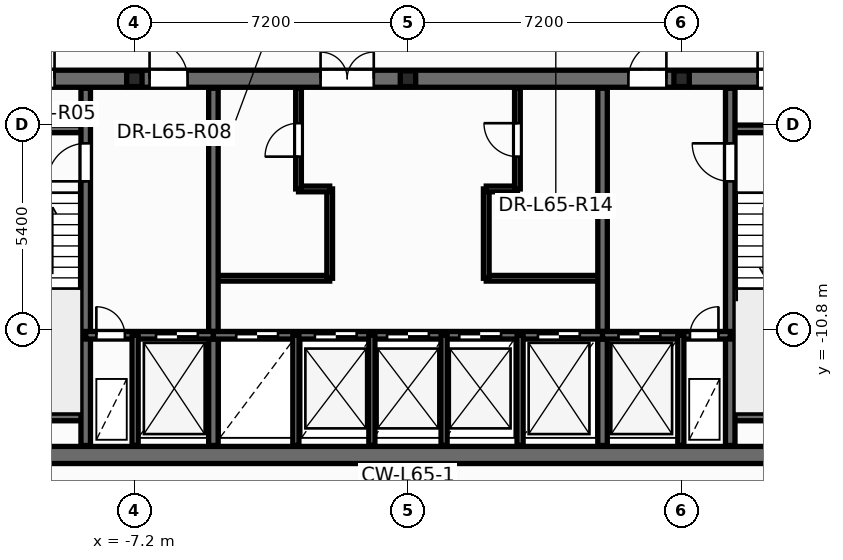
"""IFC4 building model, lengths in metres.
Left out: names, types, materials, properties, quantities, classifications, styles, units other than length and angle.
Written with IfcOpenShell. Run it as: python <this file> out.ifc"""

import sys

from ifc_helpers import new_model, si_unit, direction, frame, frame_2d, origin, origin_2d, place, context, subcontext, project, spatial, rectangle, i_section, extrude, element, fill, save


model = new_model("IFC4")
c1 = context("Model", 3, precision=1e-05, world=origin(), true_north=direction((0.0, 1.0)))
c2 = subcontext(c1, "Body", "Model", "MODEL_VIEW")
j1 = project(units=[si_unit("LENGTHUNIT", "METRE"), si_unit("PLANEANGLEUNIT", "RADIAN")], contexts=[c1])
p1 = place(None, origin())
s1 = spatial("IfcSite", under=j1, at=p1, CompositionType="ELEMENT")
p2 = place(p1, origin())
s2 = spatial("IfcBuilding", under=s1, at=p2, CompositionType="ELEMENT")
p3 = place(p2, frame((0.0, 0.0, 249.0)))
s3 = spatial("IfcBuildingStorey", under=s2, at=p3, CompositionType="ELEMENT", Elevation=249.0)
for number, where, z_axis, x_axis in (
    (1, (-7.2, -4.2, 0.0), (0.0, 0.0, 1.0), (1.0, 0.0, 0.0)),
    (2, (0.0, -4.2, 0.0), (0.0, 0.0, 1.0), (1.0, 0.0, 0.0)),
    (3, (7.2, -4.2, 0.0), (0.0, 0.0, 1.0), (1.0, 0.0, 0.0)),
):
    element("IfcColumn", number, at=place(p3, frame(where, z_axis=z_axis, x_axis=x_axis)), inside=s3, PredefinedType="PILASTER", context=c2, shape_type="SweptSolid", body=[
        extrude(i_section(OverallWidth=0.405, OverallDepth=0.414, WebThickness=0.022, FlangeThickness=0.032, at=origin_2d()), origin(), (0.0, 0.0, 1.0), 3.6),
    ])
p4 = place(p3, frame((-5.12, -9.45, 0.0), z_axis=(0.0, 0.0, 1.0), x_axis=(1.0, 0.0, 0.0)))
e4 = element("IfcWall", 4, at=p4, inside=s3, PredefinedType="PARTITIONING", context=c2, shape_type="SweptSolid", body=[
    extrude(rectangle(XDim=3.06, YDim=0.15, at=frame_2d((1.53, 0.0))), origin(), (0.0, 0.0, 1.0), 3.345),
])
p5 = place(p3, frame((-2.06, -9.45, 0.0), z_axis=(0.0, 0.0, 1.0), x_axis=(0.0, 1.0, 0.0)))
e5 = element("IfcWall", 5, at=p5, inside=s3, PredefinedType="PARTITIONING", context=c2, shape_type="SweptSolid", body=[
    extrude(rectangle(XDim=2.35, YDim=0.15, at=frame_2d((1.175, 0.0))), origin(), (0.0, 0.0, 1.0), 3.345),
])
p6 = place(p3, frame((-2.88, -7.1, 0.0), z_axis=(0.0, 0.0, 1.0), x_axis=(1.0, 0.0, 0.0)))
e6 = element("IfcWall", 6, at=p6, inside=s3, PredefinedType="PARTITIONING", context=c2, shape_type="SweptSolid", body=[
    extrude(rectangle(XDim=0.82, YDim=0.15, at=frame_2d((0.41, 0.0))), origin(), (0.0, 0.0, 1.0), 3.345),
])
p7 = place(p3, frame((-2.88, -7.1, 0.0), z_axis=(0.0, 0.0, 1.0), x_axis=(0.0, 1.0, 0.0)))
e7 = element("IfcWall", 7, at=p7, inside=s3, PredefinedType="PARTITIONING", context=c2, shape_type="SweptSolid", body=[
    extrude(rectangle(XDim=2.65, YDim=0.15, at=frame_2d((1.325, 0.0))), origin(), (0.0, 0.0, 1.0), 3.345),
])
p8 = place(p7, frame((0.85, 0.0, 0.0)))
e8 = element("IfcOpeningElement", 8, at=p8, cuts=e7, PredefinedType="OPENING", context=c2, shape_type="SweptSolid", body=[
    extrude(rectangle(XDim=0.886, YDim=2.104, at=frame_2d((0.44, 1.052))), frame((0.0, 0.085, 0.0), z_axis=(0.0, -1.0, 0.0), x_axis=(1.0, 0.0, 0.0)), (0.0, 0.0, 1.0), 0.17),
])
p9 = place(p3, frame((2.06, -9.45, 0.0), z_axis=(0.0, 0.0, 1.0), x_axis=(1.0, 0.0, 0.0)))
e9 = element("IfcWall", 9, at=p9, inside=s3, PredefinedType="PARTITIONING", context=c2, shape_type="SweptSolid", body=[
    extrude(rectangle(XDim=3.06, YDim=0.15, at=frame_2d((1.53, 0.0))), origin(), (0.0, 0.0, 1.0), 3.345),
])
p10 = place(p3, frame((2.06, -9.45, 0.0), z_axis=(0.0, 0.0, 1.0), x_axis=(0.0, 1.0, 0.0)))
e10 = element("IfcWall", 10, at=p10, inside=s3, PredefinedType="PARTITIONING", context=c2, shape_type="SweptSolid", body=[
    extrude(rectangle(XDim=2.35, YDim=0.15, at=frame_2d((1.175, 0.0))), origin(), (0.0, 0.0, 1.0), 3.345),
])
p11 = place(p3, frame((2.06, -7.1, 0.0), z_axis=(0.0, 0.0, 1.0), x_axis=(1.0, 0.0, 0.0)))
e11 = element("IfcWall", 11, at=p11, inside=s3, PredefinedType="PARTITIONING", context=c2, shape_type="SweptSolid", body=[
    extrude(rectangle(XDim=0.82, YDim=0.15, at=frame_2d((0.41, 0.0))), origin(), (0.0, 0.0, 1.0), 3.345),
])
p12 = place(p3, frame((2.88, -7.1, 0.0), z_axis=(0.0, 0.0, 1.0), x_axis=(0.0, 1.0, 0.0)))
e12 = element("IfcWall", 12, at=p12, inside=s3, PredefinedType="PARTITIONING", context=c2, shape_type="SweptSolid", body=[
    extrude(rectangle(XDim=2.65, YDim=0.15, at=frame_2d((1.325, 0.0))), origin(), (0.0, 0.0, 1.0), 3.345),
])
p13 = place(p12, frame((0.85, 0.0, 0.0)))
e13 = element("IfcOpeningElement", 13, at=p13, cuts=e12, PredefinedType="OPENING", context=c2, shape_type="SweptSolid", body=[
    extrude(rectangle(XDim=0.886, YDim=2.104, at=frame_2d((0.44, 1.052))), frame((0.0, 0.085, 0.0), z_axis=(0.0, -1.0, 0.0), x_axis=(1.0, 0.0, 0.0)), (0.0, 0.0, 1.0), 0.17),
])
p14 = place(p3, frame((-12.65, -14.1, 0.0), z_axis=(0.0, 0.0, 1.0), x_axis=(1.0, 0.0, 0.0)))
e14 = element("IfcWall", 14, at=p14, inside=s3, PredefinedType="SHEAR", context=c2, shape_type="SweptSolid", body=[
    extrude(rectangle(XDim=25.3, YDim=0.45, at=frame_2d((12.65, 0.0))), origin(), (0.0, 0.0, 1.0), 3.6),
])
p15 = place(p3, frame((-12.65, -4.2, 0.0), z_axis=(0.0, 0.0, 1.0), x_axis=(1.0, 0.0, 0.0)))
e15 = element("IfcWall", 15, at=p15, inside=s3, PredefinedType="SHEAR", context=c2, shape_type="SweptSolid", body=[
    extrude(rectangle(XDim=25.3, YDim=0.45, at=frame_2d((12.65, 0.0))), origin(), (0.0, 0.0, 1.0), 3.6),
])
p16 = place(p15, frame((0.95, 0.0, 0.0)))
e16 = element("IfcOpeningElement", 16, at=p16, cuts=e15, PredefinedType="OPENING", context=c2, shape_type="SweptSolid", body=[
    extrude(rectangle(XDim=0.756, YDim=2.054, at=frame_2d((0.375, 1.027))), frame((0.0, 0.235, 0.0), z_axis=(0.0, -1.0, 0.0), x_axis=(1.0, 0.0, 0.0)), (0.0, 0.0, 1.0), 0.47),
])
p17 = place(p15, frame((2.6, 0.0, 0.0)))
e17 = element("IfcOpeningElement", 17, at=p17, cuts=e15, PredefinedType="OPENING", context=c2, shape_type="SweptSolid", body=[
    extrude(rectangle(XDim=0.756, YDim=2.054, at=frame_2d((0.375, 1.027))), frame((0.0, 0.235, 0.0), z_axis=(0.0, -1.0, 0.0), x_axis=(1.0, 0.0, 0.0)), (0.0, 0.0, 1.0), 0.47),
])
p18 = place(p15, frame((21.85, 0.0, 0.0)))
e18 = element("IfcOpeningElement", 18, at=p18, cuts=e15, PredefinedType="OPENING", context=c2, shape_type="SweptSolid", body=[
    extrude(rectangle(XDim=0.756, YDim=2.054, at=frame_2d((0.375, 1.027))), frame((0.0, 0.235, 0.0), z_axis=(0.0, -1.0, 0.0), x_axis=(1.0, 0.0, 0.0)), (0.0, 0.0, 1.0), 0.47),
])
p19 = place(p15, frame((23.5, 0.0, 0.0)))
e19 = element("IfcOpeningElement", 19, at=p19, cuts=e15, PredefinedType="OPENING", context=c2, shape_type="SweptSolid", body=[
    extrude(rectangle(XDim=0.756, YDim=2.054, at=frame_2d((0.375, 1.027))), frame((0.0, 0.235, 0.0), z_axis=(0.0, -1.0, 0.0), x_axis=(1.0, 0.0, 0.0)), (0.0, 0.0, 1.0), 0.47),
])
p20 = place(p15, frame((5.85, 0.0, 0.0)))
e20 = element("IfcOpeningElement", 20, at=p20, cuts=e15, PredefinedType="OPENING", context=c2, shape_type="SweptSolid", body=[
    extrude(rectangle(XDim=1.006, YDim=2.104, at=frame_2d((0.5, 1.052))), frame((0.0, 0.235, 0.0), z_axis=(0.0, -1.0, 0.0), x_axis=(1.0, 0.0, 0.0)), (0.0, 0.0, 1.0), 0.47),
])
p21 = place(p15, frame((10.35, 0.0, 0.0)))
e21 = element("IfcOpeningElement", 21, at=p21, cuts=e15, PredefinedType="OPENING", context=c2, shape_type="SweptSolid", body=[
    extrude(rectangle(XDim=1.406, YDim=2.154, at=frame_2d((0.7, 1.077))), frame((0.0, 0.235, 0.0), z_axis=(0.0, -1.0, 0.0), x_axis=(1.0, 0.0, 0.0)), (0.0, 0.0, 1.0), 0.47),
])
p22 = place(p15, frame((18.45, 0.0, 0.0)))
e22 = element("IfcOpeningElement", 22, at=p22, cuts=e15, PredefinedType="OPENING", context=c2, shape_type="SweptSolid", body=[
    extrude(rectangle(XDim=1.006, YDim=2.104, at=frame_2d((0.5, 1.052))), frame((0.0, 0.235, 0.0), z_axis=(0.0, -1.0, 0.0), x_axis=(1.0, 0.0, 0.0)), (0.0, 0.0, 1.0), 0.47),
])
for number, where, z_axis, x_axis in (
    (23, (-12.35, -5.52, 0.0), (0.0, 0.0, 1.0), (1.0, 0.0, 0.0)),
    (24, (-12.35, -13.1, 0.0), (0.0, 0.0, 1.0), (1.0, 0.0, 0.0)),
    (25, (8.48, -5.52, 0.0), (0.0, 0.0, 1.0), (1.0, 0.0, 0.0)),
    (26, (8.48, -13.1, 0.0), (0.0, 0.0, 1.0), (1.0, 0.0, 0.0)),
):
    element("IfcWall", number, at=place(p3, frame(where, z_axis=z_axis, x_axis=x_axis)), inside=s3, PredefinedType="SOLIDWALL", context=c2, shape_type="SweptSolid", body=[
        extrude(rectangle(XDim=3.87, YDim=0.2, at=frame_2d((1.935, 0.0))), origin(), (0.0, 0.0, 1.0), 3.6),
    ])
p23 = place(p3, frame((-8.48, -13.85, 0.0), z_axis=(0.0, 0.0, 1.0), x_axis=(0.0, 1.0, 0.0)))
e27 = element("IfcWall", 27, at=p23, inside=s3, PredefinedType="SHEAR", context=c2, shape_type="SweptSolid", body=[
    extrude(rectangle(XDim=9.4, YDim=0.25, at=frame_2d((4.7, 0.0))), origin(), (0.0, 0.0, 1.0), 3.6),
])
p24 = place(p23, frame((6.95, 0.0, 0.0)))
e28 = element("IfcOpeningElement", 28, at=p24, cuts=e27, PredefinedType="OPENING", context=c2, shape_type="SweptSolid", body=[
    extrude(rectangle(XDim=1.006, YDim=2.104, at=frame_2d((0.5, 1.052))), frame((0.0, 0.135, 0.0), z_axis=(0.0, -1.0, 0.0), x_axis=(1.0, 0.0, 0.0)), (0.0, 0.0, 1.0), 0.27),
])
p25 = place(p3, frame((8.48, -13.85, 0.0), z_axis=(0.0, 0.0, 1.0), x_axis=(0.0, 1.0, 0.0)))
e29 = element("IfcWall", 29, at=p25, inside=s3, PredefinedType="SHEAR", context=c2, shape_type="SweptSolid", body=[
    extrude(rectangle(XDim=9.4, YDim=0.25, at=frame_2d((4.7, 0.0))), origin(), (0.0, 0.0, 1.0), 3.6),
])
p26 = place(p25, frame((6.95, 0.0, 0.0)))
e30 = element("IfcOpeningElement", 30, at=p26, cuts=e29, PredefinedType="OPENING", context=c2, shape_type="SweptSolid", body=[
    extrude(rectangle(XDim=1.006, YDim=2.104, at=frame_2d((0.5, 1.052))), frame((0.0, 0.135, 0.0), z_axis=(0.0, -1.0, 0.0), x_axis=(1.0, 0.0, 0.0)), (0.0, 0.0, 1.0), 0.27),
])
for number, where, z_axis, x_axis in (
    (31, (-5.12, -13.85, 0.0), (0.0, 0.0, 1.0), (0.0, 1.0, 0.0)),
    (32, (5.12, -13.85, 0.0), (0.0, 0.0, 1.0), (0.0, 1.0, 0.0)),
):
    element("IfcWall", number, at=place(p3, frame(where, z_axis=z_axis, x_axis=x_axis)), inside=s3, PredefinedType="SHEAR", context=c2, shape_type="SweptSolid", body=[
        extrude(rectangle(XDim=9.4, YDim=0.25, at=frame_2d((4.7, 0.0))), origin(), (0.0, 0.0, 1.0), 3.6),
    ])
p27 = place(p3, frame((-8.48, -10.95, 0.0), z_axis=(0.0, 0.0, 1.0), x_axis=(1.0, 0.0, 0.0)))
e33 = element("IfcWall", 33, at=p27, inside=s3, PredefinedType="SOLIDWALL", context=c2, shape_type="SweptSolid", body=[
    extrude(rectangle(XDim=3.36, YDim=0.2, at=frame_2d((1.68, 0.0))), origin(), (0.0, 0.0, 1.0), 3.6),
])
p28 = place(p27, frame((0.28, 0.0, 0.0)))
e34 = element("IfcOpeningElement", 34, at=p28, cuts=e33, PredefinedType="OPENING", context=c2, shape_type="SweptSolid", body=[
    extrude(rectangle(XDim=0.756, YDim=2.054, at=frame_2d((0.375, 1.027))), frame((0.0, 0.11, 0.0), z_axis=(0.0, -1.0, 0.0), x_axis=(1.0, 0.0, 0.0)), (0.0, 0.0, 1.0), 0.22),
])
p29 = place(p27, frame((1.85, 0.0, 0.0)))
e35 = element("IfcOpeningElement", 35, at=p29, cuts=e33, PredefinedType="OPENING", context=c2, shape_type="SweptSolid", body=[
    extrude(rectangle(XDim=1.106, YDim=2.104, at=frame_2d((0.55, 1.052))), frame((0.0, 0.11, 0.0), z_axis=(0.0, -1.0, 0.0), x_axis=(1.0, 0.0, 0.0)), (0.0, 0.0, 1.0), 0.22),
])
p30 = place(p3, frame((-5.12, -10.95, 0.0), z_axis=(0.0, 0.0, 1.0), x_axis=(1.0, 0.0, 0.0)))
e36 = element("IfcWall", 36, at=p30, inside=s3, PredefinedType="SOLIDWALL", context=c2, shape_type="SweptSolid", body=[
    extrude(rectangle(XDim=10.24, YDim=0.2, at=frame_2d((5.12, 0.0))), origin(), (0.0, 0.0, 1.0), 3.6),
])
p31 = place(p30, frame((0.6, 0.0, 0.0)))
e37 = element("IfcOpeningElement", 37, at=p31, cuts=e36, PredefinedType="OPENING", context=c2, shape_type="SweptSolid", body=[
    extrude(rectangle(XDim=1.106, YDim=2.104, at=frame_2d((0.55, 1.052))), frame((0.0, 0.11, 0.0), z_axis=(0.0, -1.0, 0.0), x_axis=(1.0, 0.0, 0.0)), (0.0, 0.0, 1.0), 0.22),
])
p32 = place(p30, frame((2.67, 0.0, 0.0)))
e38 = element("IfcOpeningElement", 38, at=p32, cuts=e36, PredefinedType="OPENING", context=c2, shape_type="SweptSolid", body=[
    extrude(rectangle(XDim=1.106, YDim=2.104, at=frame_2d((0.55, 1.052))), frame((0.0, 0.11, 0.0), z_axis=(0.0, -1.0, 0.0), x_axis=(1.0, 0.0, 0.0)), (0.0, 0.0, 1.0), 0.22),
])
p33 = place(p30, frame((4.57, 0.0, 0.0)))
e39 = element("IfcOpeningElement", 39, at=p33, cuts=e36, PredefinedType="OPENING", context=c2, shape_type="SweptSolid", body=[
    extrude(rectangle(XDim=1.106, YDim=2.104, at=frame_2d((0.55, 1.052))), frame((0.0, 0.11, 0.0), z_axis=(0.0, -1.0, 0.0), x_axis=(1.0, 0.0, 0.0)), (0.0, 0.0, 1.0), 0.22),
])
p34 = place(p30, frame((6.47, 0.0, 0.0)))
e40 = element("IfcOpeningElement", 40, at=p34, cuts=e36, PredefinedType="OPENING", context=c2, shape_type="SweptSolid", body=[
    extrude(rectangle(XDim=1.106, YDim=2.104, at=frame_2d((0.55, 1.052))), frame((0.0, 0.11, 0.0), z_axis=(0.0, -1.0, 0.0), x_axis=(1.0, 0.0, 0.0)), (0.0, 0.0, 1.0), 0.22),
])
p35 = place(p30, frame((8.54, 0.0, 0.0)))
e41 = element("IfcOpeningElement", 41, at=p35, cuts=e36, PredefinedType="OPENING", context=c2, shape_type="SweptSolid", body=[
    extrude(rectangle(XDim=1.106, YDim=2.104, at=frame_2d((0.55, 1.052))), frame((0.0, 0.11, 0.0), z_axis=(0.0, -1.0, 0.0), x_axis=(1.0, 0.0, 0.0)), (0.0, 0.0, 1.0), 0.22),
])
p36 = place(p3, frame((5.12, -10.95, 0.0), z_axis=(0.0, 0.0, 1.0), x_axis=(1.0, 0.0, 0.0)))
e42 = element("IfcWall", 42, at=p36, inside=s3, PredefinedType="SOLIDWALL", context=c2, shape_type="SweptSolid", body=[
    extrude(rectangle(XDim=3.36, YDim=0.2, at=frame_2d((1.68, 0.0))), origin(), (0.0, 0.0, 1.0), 3.6),
])
p37 = place(p36, frame((0.42, 0.0, 0.0)))
e43 = element("IfcOpeningElement", 43, at=p37, cuts=e42, PredefinedType="OPENING", context=c2, shape_type="SweptSolid", body=[
    extrude(rectangle(XDim=1.106, YDim=2.104, at=frame_2d((0.55, 1.052))), frame((0.0, 0.11, 0.0), z_axis=(0.0, -1.0, 0.0), x_axis=(1.0, 0.0, 0.0)), (0.0, 0.0, 1.0), 0.22),
])
p38 = place(p36, frame((2.3, 0.0, 0.0)))
e44 = element("IfcOpeningElement", 44, at=p38, cuts=e42, PredefinedType="OPENING", context=c2, shape_type="SweptSolid", body=[
    extrude(rectangle(XDim=0.756, YDim=2.054, at=frame_2d((0.375, 1.027))), frame((0.0, 0.11, 0.0), z_axis=(0.0, -1.0, 0.0), x_axis=(1.0, 0.0, 0.0)), (0.0, 0.0, 1.0), 0.22),
])
for number, where, z_axis, x_axis in (
    (45, (-7.18, -13.85, 0.0), (0.0, 0.0, 1.0), (0.0, 1.0, 0.0)),
    (46, (7.18, -13.85, 0.0), (0.0, 0.0, 1.0), (0.0, 1.0, 0.0)),
    (47, (-2.95, -13.85, 0.0), (0.0, 0.0, 1.0), (0.0, 1.0, 0.0)),
    (48, (2.95, -13.85, 0.0), (0.0, 0.0, 1.0), (0.0, 1.0, 0.0)),
    (49, (-0.95, -13.85, 0.0), (0.0, 0.0, 1.0), (0.0, 1.0, 0.0)),
    (50, (0.95, -13.85, 0.0), (0.0, 0.0, 1.0), (0.0, 1.0, 0.0)),
):
    element("IfcWall", number, at=place(p3, frame(where, z_axis=z_axis, x_axis=x_axis)), inside=s3, PredefinedType="PARTITIONING", context=c2, shape_type="SweptSolid", body=[
        extrude(rectangle(XDim=2.9, YDim=0.16, at=frame_2d((1.45, 0.0))), origin(), (0.0, 0.0, 1.0), 2.57),
    ])
p39 = place(p8, origin())
e51 = element("IfcDoor", 51, at=p39, inside=s3, OperationType="SINGLE_SWING_LEFT", PredefinedType="DOOR", context=c2, shape_type="SweptSolid", body=[
    extrude(rectangle(XDim=0.88, YDim=2.1, at=frame_2d((0.44, 1.05))), frame((0.0, 0.025, 0.0), z_axis=(0.0, -1.0, 0.0), x_axis=(1.0, 0.0, 0.0)), (0.0, 0.0, 1.0), 0.05),
])
fill(e8, e51)
p40 = place(p13, origin())
e52 = element("IfcDoor", 52, at=p40, inside=s3, OperationType="SINGLE_SWING_RIGHT", PredefinedType="DOOR", context=c2, shape_type="SweptSolid", body=[
    extrude(rectangle(XDim=0.88, YDim=2.1, at=frame_2d((0.44, 1.05))), frame((0.0, 0.025, 0.0), z_axis=(0.0, -1.0, 0.0), x_axis=(1.0, 0.0, 0.0)), (0.0, 0.0, 1.0), 0.05),
])
fill(e13, e52)
p41 = place(p24, origin())
e53 = element("IfcDoor", 53, at=p41, inside=s3, OperationType="SINGLE_SWING_LEFT", PredefinedType="DOOR", context=c2, shape_type="SweptSolid", body=[
    extrude(rectangle(XDim=1.0, YDim=2.1, at=frame_2d((0.5, 1.05))), frame((0.0, 0.025, 0.0), z_axis=(0.0, -1.0, 0.0), x_axis=(1.0, 0.0, 0.0)), (0.0, 0.0, 1.0), 0.05),
])
fill(e28, e53)
p42 = place(p26, origin())
e54 = element("IfcDoor", 54, at=p42, inside=s3, OperationType="SINGLE_SWING_RIGHT", PredefinedType="DOOR", context=c2, shape_type="SweptSolid", body=[
    extrude(rectangle(XDim=1.0, YDim=2.1, at=frame_2d((0.5, 1.05))), frame((0.0, 0.025, 0.0), z_axis=(0.0, -1.0, 0.0), x_axis=(1.0, 0.0, 0.0)), (0.0, 0.0, 1.0), 0.05),
])
fill(e30, e54)
p43 = place(p28, origin())
e55 = element("IfcDoor", 55, at=p43, inside=s3, OperationType="SINGLE_SWING_LEFT", PredefinedType="DOOR", context=c2, shape_type="SweptSolid", body=[
    extrude(rectangle(XDim=0.75, YDim=2.05, at=frame_2d((0.375, 1.025))), frame((0.0, 0.025, 0.0), z_axis=(0.0, -1.0, 0.0), x_axis=(1.0, 0.0, 0.0)), (0.0, 0.0, 1.0), 0.05),
])
fill(e34, e55)
p44 = place(p29, origin())
e56 = element("IfcDoor", 56, at=p44, inside=s3, OperationType="DOUBLE_DOOR_SLIDING", PredefinedType="DOOR", context=c2, shape_type="SweptSolid", body=[
    extrude(rectangle(XDim=1.1, YDim=2.1, at=frame_2d((0.55, 1.05))), frame((0.0, 0.025, 0.0), z_axis=(0.0, -1.0, 0.0), x_axis=(1.0, 0.0, 0.0)), (0.0, 0.0, 1.0), 0.05),
])
fill(e35, e56)
p45 = place(p37, origin())
e57 = element("IfcDoor", 57, at=p45, inside=s3, OperationType="DOUBLE_DOOR_SLIDING", PredefinedType="DOOR", context=c2, shape_type="SweptSolid", body=[
    extrude(rectangle(XDim=1.1, YDim=2.1, at=frame_2d((0.55, 1.05))), frame((0.0, 0.025, 0.0), z_axis=(0.0, -1.0, 0.0), x_axis=(1.0, 0.0, 0.0)), (0.0, 0.0, 1.0), 0.05),
])
fill(e43, e57)
p46 = place(p38, origin())
e58 = element("IfcDoor", 58, at=p46, inside=s3, OperationType="SINGLE_SWING_RIGHT", PredefinedType="DOOR", context=c2, shape_type="SweptSolid", body=[
    extrude(rectangle(XDim=0.75, YDim=2.05, at=frame_2d((0.375, 1.025))), frame((0.0, 0.025, 0.0), z_axis=(0.0, -1.0, 0.0), x_axis=(1.0, 0.0, 0.0)), (0.0, 0.0, 1.0), 0.05),
])
fill(e44, e58)
p47 = place(p31, origin())
e59 = element("IfcDoor", 59, at=p47, inside=s3, OperationType="DOUBLE_DOOR_SLIDING", PredefinedType="DOOR", context=c2, shape_type="SweptSolid", body=[
    extrude(rectangle(XDim=1.1, YDim=2.1, at=frame_2d((0.55, 1.05))), frame((0.0, 0.025, 0.0), z_axis=(0.0, -1.0, 0.0), x_axis=(1.0, 0.0, 0.0)), (0.0, 0.0, 1.0), 0.05),
])
fill(e37, e59)
p48 = place(p32, origin())
e60 = element("IfcDoor", 60, at=p48, inside=s3, OperationType="DOUBLE_DOOR_SLIDING", PredefinedType="DOOR", context=c2, shape_type="SweptSolid", body=[
    extrude(rectangle(XDim=1.1, YDim=2.1, at=frame_2d((0.55, 1.05))), frame((0.0, 0.025, 0.0), z_axis=(0.0, -1.0, 0.0), x_axis=(1.0, 0.0, 0.0)), (0.0, 0.0, 1.0), 0.05),
])
fill(e38, e60)
p49 = place(p33, origin())
e61 = element("IfcDoor", 61, at=p49, inside=s3, OperationType="DOUBLE_DOOR_SLIDING", PredefinedType="DOOR", context=c2, shape_type="SweptSolid", body=[
    extrude(rectangle(XDim=1.1, YDim=2.1, at=frame_2d((0.55, 1.05))), frame((0.0, 0.025, 0.0), z_axis=(0.0, -1.0, 0.0), x_axis=(1.0, 0.0, 0.0)), (0.0, 0.0, 1.0), 0.05),
])
fill(e39, e61)
p50 = place(p34, origin())
e62 = element("IfcDoor", 62, at=p50, inside=s3, OperationType="DOUBLE_DOOR_SLIDING", PredefinedType="DOOR", context=c2, shape_type="SweptSolid", body=[
    extrude(rectangle(XDim=1.1, YDim=2.1, at=frame_2d((0.55, 1.05))), frame((0.0, 0.025, 0.0), z_axis=(0.0, -1.0, 0.0), x_axis=(1.0, 0.0, 0.0)), (0.0, 0.0, 1.0), 0.05),
])
fill(e40, e62)
p51 = place(p35, origin())
e63 = element("IfcDoor", 63, at=p51, inside=s3, OperationType="DOUBLE_DOOR_SLIDING", PredefinedType="DOOR", context=c2, shape_type="SweptSolid", body=[
    extrude(rectangle(XDim=1.1, YDim=2.1, at=frame_2d((0.55, 1.05))), frame((0.0, 0.025, 0.0), z_axis=(0.0, -1.0, 0.0), x_axis=(1.0, 0.0, 0.0)), (0.0, 0.0, 1.0), 0.05),
])
fill(e41, e63)
p52 = place(p17, origin())
e64 = element("IfcDoor", 64, at=p52, inside=s3, OperationType="SINGLE_SWING_RIGHT", PredefinedType="DOOR", context=c2, shape_type="SweptSolid", body=[
    extrude(rectangle(XDim=0.75, YDim=2.05, at=frame_2d((0.375, 1.025))), frame((0.0, 0.025, 0.0), z_axis=(0.0, -1.0, 0.0), x_axis=(1.0, 0.0, 0.0)), (0.0, 0.0, 1.0), 0.05),
])
fill(e17, e64)
p53 = place(p18, origin())
e65 = element("IfcDoor", 65, at=p53, inside=s3, OperationType="SINGLE_SWING_LEFT", PredefinedType="DOOR", context=c2, shape_type="SweptSolid", body=[
    extrude(rectangle(XDim=0.75, YDim=2.05, at=frame_2d((0.375, 1.025))), frame((0.0, 0.025, 0.0), z_axis=(0.0, -1.0, 0.0), x_axis=(1.0, 0.0, 0.0)), (0.0, 0.0, 1.0), 0.05),
])
fill(e18, e65)
p54 = place(p20, origin())
e66 = element("IfcDoor", 66, at=p54, inside=s3, OperationType="SINGLE_SWING_LEFT", PredefinedType="DOOR", context=c2, shape_type="SweptSolid", body=[
    extrude(rectangle(XDim=1.0, YDim=2.1, at=frame_2d((0.5, 1.05))), frame((0.0, 0.025, 0.0), z_axis=(0.0, -1.0, 0.0), x_axis=(1.0, 0.0, 0.0)), (0.0, 0.0, 1.0), 0.05),
])
fill(e20, e66)
p55 = place(p21, origin())
e67 = element("IfcDoor", 67, at=p55, inside=s3, OperationType="DOUBLE_DOOR_SINGLE_SWING", PredefinedType="DOOR", context=c2, shape_type="SweptSolid", body=[
    extrude(rectangle(XDim=1.4, YDim=2.15, at=frame_2d((0.7, 1.075))), frame((0.0, 0.025, 0.0), z_axis=(0.0, -1.0, 0.0), x_axis=(1.0, 0.0, 0.0)), (0.0, 0.0, 1.0), 0.05),
])
fill(e21, e67)
p56 = place(p22, origin())
e68 = element("IfcDoor", 68, at=p56, inside=s3, OperationType="SINGLE_SWING_RIGHT", PredefinedType="DOOR", context=c2, shape_type="SweptSolid", body=[
    extrude(rectangle(XDim=1.0, YDim=2.1, at=frame_2d((0.5, 1.05))), frame((0.0, 0.025, 0.0), z_axis=(0.0, -1.0, 0.0), x_axis=(1.0, 0.0, 0.0)), (0.0, 0.0, 1.0), 0.05),
])
fill(e22, e68)
save(model, sys.argv[1])
